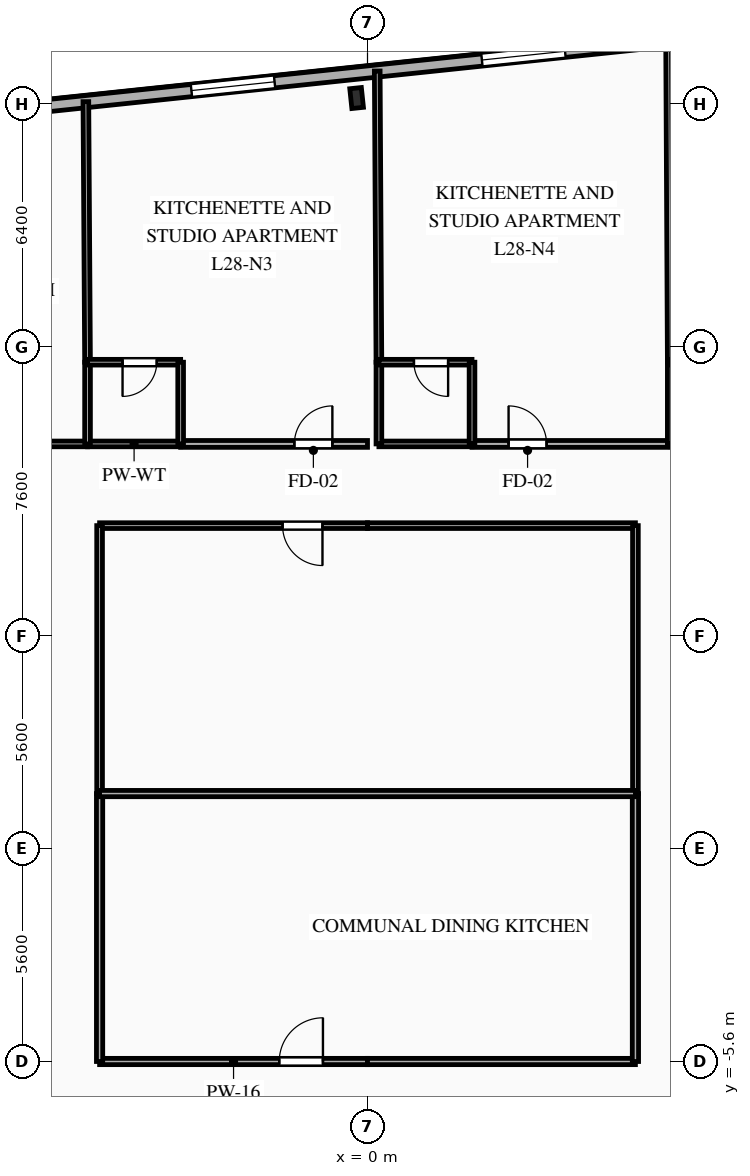
"""IFC4 building model, lengths in metres.
Left out: names, types, materials, properties, quantities, classifications, styles, units other than length and angle.
Written with IfcOpenShell. Run it as: python <this file> out.ifc"""

import sys

from ifc_helpers import new_model, si_unit, direction, frame, frame_2d, origin, origin_2d, place, context, subcontext, project, spatial, rectangle, i_section, extrude, element, fill, save


model = new_model("IFC4")
c1 = context("Model", 3, precision=1e-05, world=origin(), true_north=direction((0.0, 1.0)))
c2 = subcontext(c1, "Body", "Model", "MODEL_VIEW")
j1 = project(units=[si_unit("LENGTHUNIT", "METRE"), si_unit("PLANEANGLEUNIT", "RADIAN")], contexts=[c1])
p1 = place(None, origin())
s1 = spatial("IfcSite", under=j1, at=p1, CompositionType="ELEMENT")
p2 = place(p1, origin())
s2 = spatial("IfcBuilding", under=s1, at=p2, CompositionType="ELEMENT")
p3 = place(p2, frame((0.0, 0.0, 102.45)))
s3 = spatial("IfcBuildingStorey", under=s2, at=p3, CompositionType="ELEMENT", Elevation=102.45)
p4 = place(p3, frame((-0.287, 19.751, 0.0), z_axis=(0.0, 0.0, 1.0), x_axis=(0.994521895368, 0.104528463268, 0.0)))
e1 = element("IfcColumn", 1, at=p4, inside=s3, PredefinedType="COLUMN", context=c2, shape_type="SweptSolid", body=[
    extrude(i_section(OverallWidth=0.306, OverallDepth=0.524, WebThickness=0.021, FlangeThickness=0.04, FilletRadius=0.027, at=origin_2d()), origin(), (0.0, 0.0, 1.0), 3.35),
])
p5 = place(p3, frame((-27.107, 17.586, 0.0), z_axis=(0.0, 0.0, 1.0), x_axis=(0.994521628355, 0.104531003701, 0.0)))
e2 = element("IfcWall", 2, at=p5, inside=s3, PredefinedType="SOLIDWALL", context=c2, shape_type="SweptSolid", body=[
    extrude(rectangle(XDim=53.8, YDim=0.32, at=frame_2d((26.9, 0.0))), origin(), (0.0, 0.0, 1.0), 3.045),
])
p6 = place(p5, frame((7.261, 0.0, 0.85)))
e3 = element("IfcOpeningElement", 3, at=p6, cuts=e2, PredefinedType="OPENING", context=c2, shape_type="SweptSolid", body=[
    extrude(rectangle(XDim=1.65, YDim=1.85, at=frame_2d((0.825, 0.925))), frame((0.0, 0.17, 0.0), z_axis=(0.0, -1.0, 0.0), x_axis=(1.0, 0.0, 0.0)), (0.0, 0.0, 1.0), 0.34),
])
p7 = place(p5, frame((16.423, 0.0, 0.85)))
e4 = element("IfcOpeningElement", 4, at=p7, cuts=e2, PredefinedType="OPENING", context=c2, shape_type="SweptSolid", body=[
    extrude(rectangle(XDim=1.5, YDim=1.85, at=frame_2d((0.75, 0.925))), frame((0.0, 0.17, 0.0), z_axis=(0.0, -1.0, 0.0), x_axis=(1.0, 0.0, 0.0)), (0.0, 0.0, 1.0), 0.34),
])
p8 = place(p5, frame((22.598, 0.0, 0.85)))
e5 = element("IfcOpeningElement", 5, at=p8, cuts=e2, PredefinedType="OPENING", context=c2, shape_type="SweptSolid", body=[
    extrude(rectangle(XDim=2.2, YDim=1.85, at=frame_2d((1.1, 0.925))), frame((0.0, 0.17, 0.0), z_axis=(0.0, -1.0, 0.0), x_axis=(1.0, 0.0, 0.0)), (0.0, 0.0, 1.0), 0.34),
])
p9 = place(p5, frame((30.283, 0.0, 0.85)))
e6 = element("IfcOpeningElement", 6, at=p9, cuts=e2, PredefinedType="OPENING", context=c2, shape_type="SweptSolid", body=[
    extrude(rectangle(XDim=2.2, YDim=1.85, at=frame_2d((1.1, 0.925))), frame((0.0, 0.17, 0.0), z_axis=(0.0, -1.0, 0.0), x_axis=(1.0, 0.0, 0.0)), (0.0, 0.0, 1.0), 0.34),
])
p10 = place(p5, frame((38.009, 0.0, 0.85)))
e7 = element("IfcOpeningElement", 7, at=p10, cuts=e2, PredefinedType="OPENING", context=c2, shape_type="SweptSolid", body=[
    extrude(rectangle(XDim=2.2, YDim=1.85, at=frame_2d((1.1, 0.925))), frame((0.0, 0.17, 0.0), z_axis=(0.0, -1.0, 0.0), x_axis=(1.0, 0.0, 0.0)), (0.0, 0.0, 1.0), 0.34),
])
p11 = place(p5, frame((44.008, 0.0, 0.85)))
e8 = element("IfcOpeningElement", 8, at=p11, cuts=e2, PredefinedType="OPENING", context=c2, shape_type="SweptSolid", body=[
    extrude(rectangle(XDim=1.65, YDim=1.85, at=frame_2d((0.825, 0.925))), frame((0.0, 0.17, 0.0), z_axis=(0.0, -1.0, 0.0), x_axis=(1.0, 0.0, 0.0)), (0.0, 0.0, 1.0), 0.34),
])
p12 = place(p5, frame((47.691, 0.0, 0.85)))
e9 = element("IfcOpeningElement", 9, at=p12, cuts=e2, PredefinedType="OPENING", context=c2, shape_type="SweptSolid", body=[
    extrude(rectangle(XDim=1.65, YDim=1.85, at=frame_2d((0.825, 0.925))), frame((0.0, 0.17, 0.0), z_axis=(0.0, -1.0, 0.0), x_axis=(1.0, 0.0, 0.0)), (0.0, 0.0, 1.0), 0.34),
])
p13 = place(p5, frame((51.054, 0.0, 0.85)))
e10 = element("IfcOpeningElement", 10, at=p13, cuts=e2, PredefinedType="OPENING", context=c2, shape_type="SweptSolid", body=[
    extrude(rectangle(XDim=1.65, YDim=1.85, at=frame_2d((0.825, 0.925))), frame((0.0, 0.17, 0.0), z_axis=(0.0, -1.0, 0.0), x_axis=(1.0, 0.0, 0.0)), (0.0, 0.0, 1.0), 0.34),
])
p14 = place(p3, frame((-12.683, 10.65, 0.0), z_axis=(0.0, 0.0, 1.0), x_axis=(1.0, 0.0, 0.0)))
e11 = element("IfcWall", 11, at=p14, inside=s3, PredefinedType="PARTITIONING", context=c2, shape_type="SweptSolid", body=[
    extrude(rectangle(XDim=5.316, YDim=0.15, at=frame_2d((2.658, 0.0))), origin(), (0.0, 0.0, 1.0), 3.045),
])
p15 = place(p14, frame((0.981, 0.0, 0.0)))
e12 = element("IfcOpeningElement", 12, at=p15, cuts=e11, PredefinedType="OPENING", context=c2, shape_type="SweptSolid", body=[
    extrude(rectangle(XDim=0.95, YDim=2.1, at=frame_2d((0.475, 1.05))), frame((0.0, 0.085, 0.0), z_axis=(0.0, -1.0, 0.0), x_axis=(1.0, 0.0, 0.0)), (0.0, 0.0, 1.0), 0.17),
])
p16 = place(p3, frame((-4.917, 10.65, 0.0), z_axis=(0.0, 0.0, 1.0), x_axis=(1.0, 0.0, 0.0)))
e13 = element("IfcWall", 13, at=p16, inside=s3, PredefinedType="PARTITIONING", context=c2, shape_type="SweptSolid", body=[
    extrude(rectangle(XDim=4.917, YDim=0.18, at=frame_2d((2.458, 0.0))), origin(), (0.0, 0.0, 1.0), 3.045),
])
p17 = place(p16, frame((2.992, 0.0, 0.0)))
e14 = element("IfcOpeningElement", 14, at=p17, cuts=e13, PredefinedType="OPENING", context=c2, shape_type="SweptSolid", body=[
    extrude(rectangle(XDim=1.0, YDim=2.15, at=frame_2d((0.5, 1.075))), frame((0.0, 0.1, 0.0), z_axis=(0.0, -1.0, 0.0), x_axis=(1.0, 0.0, 0.0)), (0.0, 0.0, 1.0), 0.2),
])
p18 = place(p3, frame((-7.367, 10.65, 0.0), z_axis=(0.0, 0.0, 1.0), x_axis=(1.0, 0.0, 0.0)))
e15 = element("IfcWall", 15, at=p18, inside=s3, PredefinedType="PLUMBINGWALL", context=c2, shape_type="SweptSolid", body=[
    extrude(rectangle(XDim=2.45, YDim=0.15, at=frame_2d((1.225, 0.0))), origin(), (0.0, 0.0, 1.0), 3.045),
])
p19 = place(p3, frame((0.0, 8.5, 0.0), z_axis=(0.0, 0.0, 1.0), x_axis=(-1.0, 0.0, 0.0)))
e16 = element("IfcWall", 16, at=p19, inside=s3, PredefinedType="PARTITIONING", context=c2, shape_type="SweptSolid", body=[
    extrude(rectangle(XDim=7.05, YDim=0.15, at=frame_2d((3.525, 0.0))), origin(), (0.0, 0.0, 1.0), 3.045),
])
p20 = place(p19, frame((1.185, 0.0, 0.0)))
e17 = element("IfcOpeningElement", 17, at=p20, cuts=e16, PredefinedType="OPENING", context=c2, shape_type="SweptSolid", body=[
    extrude(rectangle(XDim=1.05, YDim=2.15, at=frame_2d((0.525, 1.075))), frame((0.0, 0.085, 0.0), z_axis=(0.0, -1.0, 0.0), x_axis=(1.0, 0.0, 0.0)), (0.0, 0.0, 1.0), 0.17),
])
p21 = place(p3, frame((2.75, 10.65, 0.0), z_axis=(0.0, 0.0, 1.0), x_axis=(1.0, 0.0, 0.0)))
e18 = element("IfcWall", 18, at=p21, inside=s3, PredefinedType="PARTITIONING", context=c2, shape_type="SweptSolid", body=[
    extrude(rectangle(XDim=5.217, YDim=0.18, at=frame_2d((2.608, 0.0))), origin(), (0.0, 0.0, 1.0), 3.045),
])
p22 = place(p21, frame((0.962, 0.0, 0.0)))
e19 = element("IfcOpeningElement", 19, at=p22, cuts=e18, PredefinedType="OPENING", context=c2, shape_type="SweptSolid", body=[
    extrude(rectangle(XDim=1.0, YDim=2.15, at=frame_2d((0.5, 1.075))), frame((0.0, 0.1, 0.0), z_axis=(0.0, -1.0, 0.0), x_axis=(1.0, 0.0, 0.0)), (0.0, 0.0, 1.0), 0.2),
])
for number, where, z_axis, x_axis in (
    (20, (0.3, 10.65, 0.0), (0.0, 0.0, 1.0), (1.0, 0.0, 0.0)),
    (21, (7.967, 10.65, 0.0), (0.0, 0.0, 1.0), (1.0, 0.0, 0.0)),
):
    element("IfcWall", number, at=place(p3, frame(where, z_axis=z_axis, x_axis=x_axis)), inside=s3, PredefinedType="PLUMBINGWALL", context=c2, shape_type="SweptSolid", body=[
        extrude(rectangle(XDim=2.45, YDim=0.15, at=frame_2d((1.225, 0.0))), origin(), (0.0, 0.0, 1.0), 3.045),
    ])
p23 = place(p3, frame((7.05, 8.5, 0.0), z_axis=(0.0, 0.0, 1.0), x_axis=(-1.0, 0.0, 0.0)))
e22 = element("IfcWall", 22, at=p23, inside=s3, PredefinedType="PARTITIONING", context=c2, shape_type="SweptSolid", body=[
    extrude(rectangle(XDim=7.05, YDim=0.15, at=frame_2d((3.525, 0.0))), origin(), (0.0, 0.0, 1.0), 3.045),
])
p24 = place(p3, frame((-7.05, -5.6, 0.0), z_axis=(0.0, 0.0, 1.0), x_axis=(1.0, 0.0, 0.0)))
e23 = element("IfcWall", 23, at=p24, inside=s3, PredefinedType="PARTITIONING", context=c2, shape_type="SweptSolid", body=[
    extrude(rectangle(XDim=7.05, YDim=0.165, at=frame_2d((3.525, 0.0))), origin(), (0.0, 0.0, 1.0), 2.53),
])
p25 = place(p24, frame((4.728, 0.0, 0.0)))
e24 = element("IfcOpeningElement", 24, at=p25, cuts=e23, PredefinedType="OPENING", context=c2, shape_type="SweptSolid", body=[
    extrude(rectangle(XDim=1.15, YDim=2.15, at=frame_2d((0.575, 1.075))), frame((0.0, 0.093, 0.0), z_axis=(0.0, -1.0, 0.0), x_axis=(1.0, 0.0, 0.0)), (0.0, 0.0, 1.0), 0.185),
])
p26 = place(p3, frame((0.0, -5.6, 0.0), z_axis=(0.0, 0.0, 1.0), x_axis=(1.0, 0.0, 0.0)))
e25 = element("IfcWall", 25, at=p26, inside=s3, PredefinedType="PARTITIONING", context=c2, shape_type="SweptSolid", body=[
    extrude(rectangle(XDim=7.05, YDim=0.165, at=frame_2d((3.525, 0.0))), origin(), (0.0, 0.0, 1.0), 2.53),
])
p27 = place(p3, frame((-7.05, 1.45, 0.0), z_axis=(0.0, 0.0, 1.0), x_axis=(0.0, -1.0, 0.0)))
e26 = element("IfcWall", 26, at=p27, inside=s3, PredefinedType="PARTITIONING", context=c2, shape_type="SweptSolid", body=[
    extrude(rectangle(XDim=7.05, YDim=0.165, at=frame_2d((3.525, 0.0))), origin(), (0.0, 0.0, 1.0), 3.045),
])
p28 = place(p3, frame((-7.05, 8.5, 0.0), z_axis=(0.0, 0.0, 1.0), x_axis=(0.0, -1.0, 0.0)))
e27 = element("IfcWall", 27, at=p28, inside=s3, PredefinedType="PARTITIONING", context=c2, shape_type="SweptSolid", body=[
    extrude(rectangle(XDim=7.05, YDim=0.15, at=frame_2d((3.525, 0.0))), origin(), (0.0, 0.0, 1.0), 3.045),
])
p29 = place(p3, frame((7.05, -5.6, 0.0), z_axis=(0.0, 0.0, 1.0), x_axis=(0.0, 1.0, 0.0)))
e28 = element("IfcWall", 28, at=p29, inside=s3, PredefinedType="PARTITIONING", context=c2, shape_type="SweptSolid", body=[
    extrude(rectangle(XDim=7.05, YDim=0.165, at=frame_2d((3.525, 0.0))), origin(), (0.0, 0.0, 1.0), 3.045),
])
p30 = place(p3, frame((7.05, 1.45, 0.0), z_axis=(0.0, 0.0, 1.0), x_axis=(0.0, 1.0, 0.0)))
e29 = element("IfcWall", 29, at=p30, inside=s3, PredefinedType="PARTITIONING", context=c2, shape_type="SweptSolid", body=[
    extrude(rectangle(XDim=7.05, YDim=0.15, at=frame_2d((3.525, 0.0))), origin(), (0.0, 0.0, 1.0), 3.045),
])
p31 = place(p3, frame((-7.411, 19.656, 0.0), z_axis=(0.0, 0.0, 1.0), x_axis=(0.006409668201, -0.999979457866, 0.0)))
e30 = element("IfcWall", 30, at=p31, inside=s3, PredefinedType="PARTITIONING", context=c2, shape_type="SweptSolid", body=[
    extrude(rectangle(XDim=6.856, YDim=0.15, at=frame_2d((3.428, 0.0))), origin(), (0.0, 0.0, 1.0), 3.045),
])
p32 = place(p3, frame((-7.367, 12.8, 0.0), z_axis=(0.0, 0.0, 1.0), x_axis=(0.0, -1.0, 0.0)))
e31 = element("IfcWall", 31, at=p32, inside=s3, PredefinedType="PLUMBINGWALL", context=c2, shape_type="SweptSolid", body=[
    extrude(rectangle(XDim=2.15, YDim=0.15, at=frame_2d((1.075, 0.0))), origin(), (0.0, 0.0, 1.0), 3.045),
])
p33 = place(p3, frame((-4.917, 12.8, 0.0), z_axis=(0.0, 0.0, 1.0), x_axis=(-1.0, 0.0, 0.0)))
e32 = element("IfcWall", 32, at=p33, inside=s3, PredefinedType="PLUMBINGWALL", context=c2, shape_type="SweptSolid", body=[
    extrude(rectangle(XDim=2.45, YDim=0.15, at=frame_2d((1.225, 0.0))), origin(), (0.0, 0.0, 1.0), 3.045),
])
p34 = place(p33, frame((0.629, 0.0, 0.0)))
e33 = element("IfcOpeningElement", 33, at=p34, cuts=e32, PredefinedType="OPENING", context=c2, shape_type="SweptSolid", body=[
    extrude(rectangle(XDim=0.9, YDim=2.1, at=frame_2d((0.45, 1.05))), frame((0.0, 0.085, 0.0), z_axis=(0.0, -1.0, 0.0), x_axis=(1.0, 0.0, 0.0)), (0.0, 0.0, 1.0), 0.17),
])
p35 = place(p3, frame((-4.917, 10.65, 0.0), z_axis=(0.0, 0.0, 1.0), x_axis=(0.0, 1.0, 0.0)))
e34 = element("IfcWall", 34, at=p35, inside=s3, PredefinedType="PLUMBINGWALL", context=c2, shape_type="SweptSolid", body=[
    extrude(rectangle(XDim=2.15, YDim=0.15, at=frame_2d((1.075, 0.0))), origin(), (0.0, 0.0, 1.0), 3.045),
])
p36 = place(p3, frame((0.256, 20.462, 0.0), z_axis=(0.0, 0.0, 1.0), x_axis=(0.00573567775, -0.999983550865, 0.0)))
e35 = element("IfcWall", 35, at=p36, inside=s3, PredefinedType="PARTITIONING", context=c2, shape_type="SweptSolid", body=[
    extrude(rectangle(XDim=7.662, YDim=0.15, at=frame_2d((3.831, 0.0))), origin(), (0.0, 0.0, 1.0), 3.045),
])
p37 = place(p3, frame((0.3, 12.8, 0.0), z_axis=(0.0, 0.0, 1.0), x_axis=(0.0, -1.0, 0.0)))
e36 = element("IfcWall", 36, at=p37, inside=s3, PredefinedType="PLUMBINGWALL", context=c2, shape_type="SweptSolid", body=[
    extrude(rectangle(XDim=2.15, YDim=0.15, at=frame_2d((1.075, 0.0))), origin(), (0.0, 0.0, 1.0), 3.045),
])
p38 = place(p3, frame((2.75, 12.8, 0.0), z_axis=(0.0, 0.0, 1.0), x_axis=(-1.0, 0.0, 0.0)))
e37 = element("IfcWall", 37, at=p38, inside=s3, PredefinedType="PLUMBINGWALL", context=c2, shape_type="SweptSolid", body=[
    extrude(rectangle(XDim=2.45, YDim=0.15, at=frame_2d((1.225, 0.0))), origin(), (0.0, 0.0, 1.0), 3.045),
])
p39 = place(p38, frame((0.629, 0.0, 0.0)))
e38 = element("IfcOpeningElement", 38, at=p39, cuts=e37, PredefinedType="OPENING", context=c2, shape_type="SweptSolid", body=[
    extrude(rectangle(XDim=0.9, YDim=2.1, at=frame_2d((0.45, 1.05))), frame((0.0, 0.085, 0.0), z_axis=(0.0, -1.0, 0.0), x_axis=(1.0, 0.0, 0.0)), (0.0, 0.0, 1.0), 0.17),
])
p40 = place(p3, frame((2.75, 10.65, 0.0), z_axis=(0.0, 0.0, 1.0), x_axis=(0.0, 1.0, 0.0)))
e39 = element("IfcWall", 39, at=p40, inside=s3, PredefinedType="PLUMBINGWALL", context=c2, shape_type="SweptSolid", body=[
    extrude(rectangle(XDim=2.15, YDim=0.15, at=frame_2d((1.075, 0.0))), origin(), (0.0, 0.0, 1.0), 3.045),
])
p41 = place(p3, frame((7.923, 21.268, 0.0), z_axis=(0.0, 0.0, 1.0), x_axis=(0.005189792576, -0.999986532936, 0.0)))
e40 = element("IfcWall", 40, at=p41, inside=s3, PredefinedType="PARTITIONING", context=c2, shape_type="SweptSolid", body=[
    extrude(rectangle(XDim=8.468, YDim=0.15, at=frame_2d((4.234, 0.0))), origin(), (0.0, 0.0, 1.0), 3.045),
])
p42 = place(p3, frame((7.967, 12.8, 0.0), z_axis=(0.0, 0.0, 1.0), x_axis=(0.0, -1.0, 0.0)))
e41 = element("IfcWall", 41, at=p42, inside=s3, PredefinedType="PLUMBINGWALL", context=c2, shape_type="SweptSolid", body=[
    extrude(rectangle(XDim=2.15, YDim=0.15, at=frame_2d((1.075, 0.0))), origin(), (0.0, 0.0, 1.0), 3.045),
])
p43 = place(p3, frame((10.417, 12.8, 0.0), z_axis=(0.0, 0.0, 1.0), x_axis=(-1.0, 0.0, 0.0)))
e42 = element("IfcWall", 42, at=p43, inside=s3, PredefinedType="PLUMBINGWALL", context=c2, shape_type="SweptSolid", body=[
    extrude(rectangle(XDim=2.45, YDim=0.15, at=frame_2d((1.225, 0.0))), origin(), (0.0, 0.0, 1.0), 3.045),
])
p44 = place(p43, frame((0.921, 0.0, 0.0)))
e43 = element("IfcOpeningElement", 43, at=p44, cuts=e42, PredefinedType="OPENING", context=c2, shape_type="SweptSolid", body=[
    extrude(rectangle(XDim=0.9, YDim=2.1, at=frame_2d((0.45, 1.05))), frame((0.0, 0.085, 0.0), z_axis=(0.0, -1.0, 0.0), x_axis=(1.0, 0.0, 0.0)), (0.0, 0.0, 1.0), 0.17),
])
p45 = place(p3, frame((-7.05, 1.45, 0.0), z_axis=(0.0, 0.0, 1.0), x_axis=(1.0, 0.0, 0.0)))
e44 = element("IfcWall", 44, at=p45, inside=s3, PredefinedType="PARTITIONING", context=c2, shape_type="SweptSolid", body=[
    extrude(rectangle(XDim=14.1, YDim=0.165, at=frame_2d((7.05, 0.0))), origin(), (0.0, 0.0, 1.0), 3.045),
])
p46 = place(p8, origin())
e45 = element("IfcWindow", 45, at=p46, inside=s3, PartitioningType="SINGLE_PANEL", PredefinedType="WINDOW", context=c2, shape_type="SweptSolid", body=[
    extrude(rectangle(XDim=2.2, YDim=1.85, at=frame_2d((1.1, 0.925))), frame((0.0, 0.03, 0.0), z_axis=(0.0, -1.0, 0.0), x_axis=(1.0, 0.0, 0.0)), (0.0, 0.0, 1.0), 0.06),
])
fill(e5, e45)
p47 = place(p9, origin())
e46 = element("IfcWindow", 46, at=p47, inside=s3, PartitioningType="SINGLE_PANEL", PredefinedType="WINDOW", context=c2, shape_type="SweptSolid", body=[
    extrude(rectangle(XDim=2.2, YDim=1.85, at=frame_2d((1.1, 0.925))), frame((0.0, 0.03, 0.0), z_axis=(0.0, -1.0, 0.0), x_axis=(1.0, 0.0, 0.0)), (0.0, 0.0, 1.0), 0.06),
])
fill(e6, e46)
p48 = place(p17, origin())
e47 = element("IfcDoor", 47, at=p48, inside=s3, OperationType="SINGLE_SWING_RIGHT", PredefinedType="DOOR", context=c2, shape_type="SweptSolid", body=[
    extrude(rectangle(XDim=1.0, YDim=2.15, at=frame_2d((0.5, 1.075))), frame((0.0, 0.025, 0.0), z_axis=(0.0, -1.0, 0.0), x_axis=(1.0, 0.0, 0.0)), (0.0, 0.0, 1.0), 0.05),
])
fill(e14, e47)
p49 = place(p20, origin())
e48 = element("IfcDoor", 48, at=p49, inside=s3, OperationType="SINGLE_SWING_LEFT", PredefinedType="DOOR", context=c2, shape_type="SweptSolid", body=[
    extrude(rectangle(XDim=1.05, YDim=2.15, at=frame_2d((0.525, 1.075))), frame((0.0, 0.025, 0.0), z_axis=(0.0, -1.0, 0.0), x_axis=(1.0, 0.0, 0.0)), (0.0, 0.0, 1.0), 0.05),
])
fill(e17, e48)
p50 = place(p22, origin())
e49 = element("IfcDoor", 49, at=p50, inside=s3, OperationType="SINGLE_SWING_LEFT", PredefinedType="DOOR", context=c2, shape_type="SweptSolid", body=[
    extrude(rectangle(XDim=1.0, YDim=2.15, at=frame_2d((0.5, 1.075))), frame((0.0, 0.025, 0.0), z_axis=(0.0, -1.0, 0.0), x_axis=(1.0, 0.0, 0.0)), (0.0, 0.0, 1.0), 0.05),
])
fill(e19, e49)
p51 = place(p25, origin())
e50 = element("IfcDoor", 50, at=p51, inside=s3, OperationType="SINGLE_SWING_RIGHT", PredefinedType="DOOR", context=c2, shape_type="SweptSolid", body=[
    extrude(rectangle(XDim=1.15, YDim=2.15, at=frame_2d((0.575, 1.075))), frame((0.0, 0.025, 0.0), z_axis=(0.0, -1.0, 0.0), x_axis=(1.0, 0.0, 0.0)), (0.0, 0.0, 1.0), 0.05),
])
fill(e24, e50)
p52 = place(p34, origin())
e51 = element("IfcDoor", 51, at=p52, inside=s3, OperationType="SINGLE_SWING_RIGHT", PredefinedType="DOOR", context=c2, shape_type="SweptSolid", body=[
    extrude(rectangle(XDim=0.9, YDim=2.1, at=frame_2d((0.45, 1.05))), frame((0.0, 0.025, 0.0), z_axis=(0.0, -1.0, 0.0), x_axis=(1.0, 0.0, 0.0)), (0.0, 0.0, 1.0), 0.05),
])
fill(e33, e51)
p53 = place(p39, origin())
e52 = element("IfcDoor", 52, at=p53, inside=s3, OperationType="SINGLE_SWING_LEFT", PredefinedType="DOOR", context=c2, shape_type="SweptSolid", body=[
    extrude(rectangle(XDim=0.9, YDim=2.1, at=frame_2d((0.45, 1.05))), frame((0.0, 0.025, 0.0), z_axis=(0.0, -1.0, 0.0), x_axis=(1.0, 0.0, 0.0)), (0.0, 0.0, 1.0), 0.05),
])
fill(e38, e52)
save(model, sys.argv[1])
